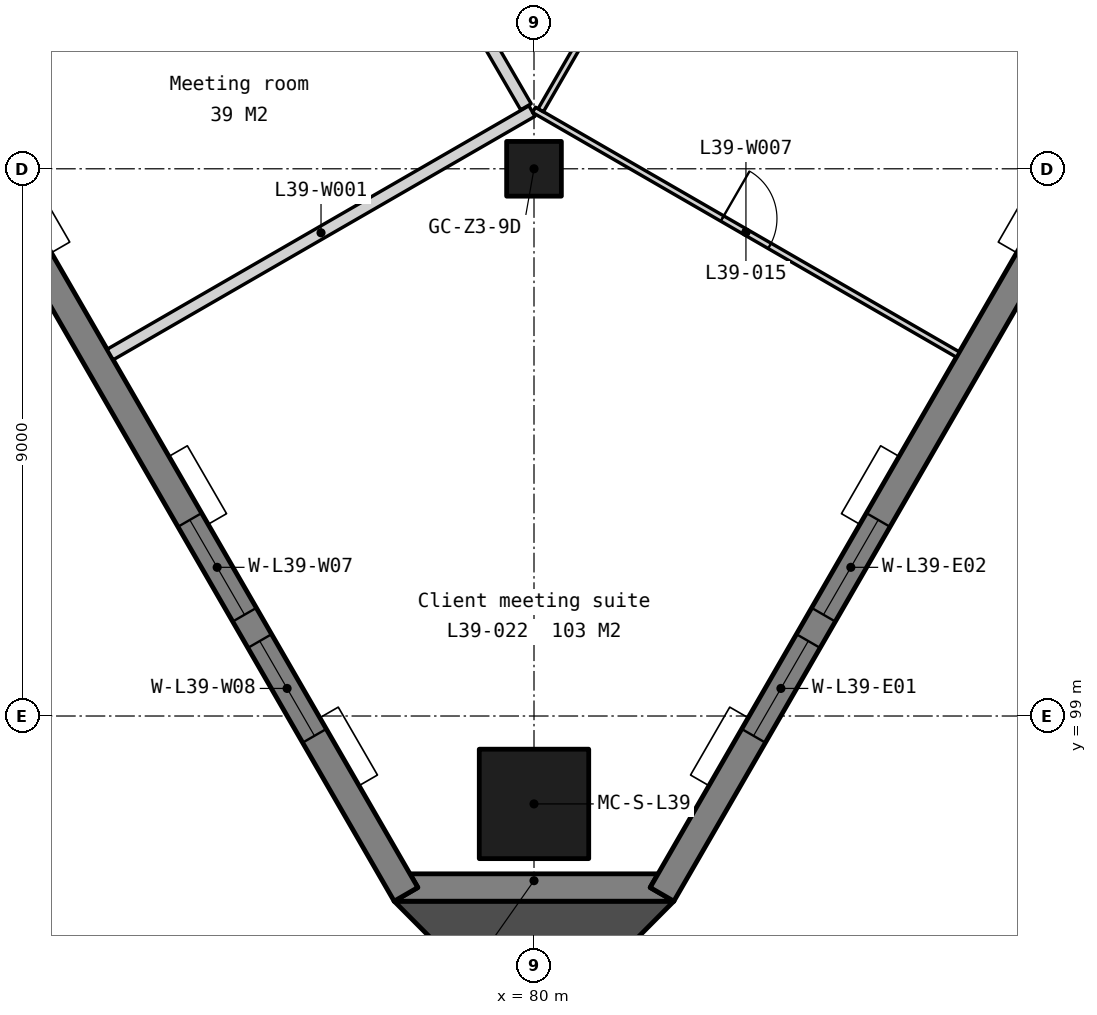
"""IFC4 building model, lengths in metres.
Left out: names, types, materials, properties, quantities, classifications, styles, units other than length and angle.
Written with IfcOpenShell. Run it as: python <this file> out.ifc"""

import sys

from ifc_helpers import new_model, si_unit, direction, frame, frame_2d, origin, origin_2d, place, context, subcontext, project, spatial, polyline, rectangle, outline, extrude, element, fill, save


model = new_model("IFC4")
c1 = context("Model", 3, precision=1e-05, world=origin(), true_north=direction((0.0, 1.0)))
c2 = subcontext(c1, "Body", "Model", "MODEL_VIEW")
j1 = project(units=[si_unit("LENGTHUNIT", "METRE"), si_unit("PLANEANGLEUNIT", "RADIAN")], contexts=[c1])
p1 = place(None, origin())
s1 = spatial("IfcSite", under=j1, at=p1, CompositionType="ELEMENT")
p2 = place(p1, origin())
s2 = spatial("IfcBuilding", under=s1, at=p2, CompositionType="ELEMENT")
p3 = place(p2, frame((0.0, 0.0, 155.9)))
s3 = spatial("IfcBuildingStorey", under=s2, at=p3, CompositionType="ELEMENT", Elevation=155.9)
p4 = place(p3, frame((80.0, 108.0, 0.0), z_axis=(0.0, 0.0, 1.0), x_axis=(1.0, 0.0, 0.0)))
e1 = element("IfcColumn", 1, at=p4, inside=s3, PredefinedType="COLUMN", context=c2, shape_type="SweptSolid", body=[
    extrude(rectangle(XDim=0.9, YDim=0.9, at=origin_2d()), origin(), (0.0, 0.0, 1.0), 3.9),
])
p5 = place(p3, frame((80.0, 97.554, 0.0), z_axis=(0.0, 0.0, 1.0), x_axis=(1.0, 0.0, 0.0)))
e2 = element("IfcColumn", 2, at=p5, inside=s3, PredefinedType="COLUMN", context=c2, shape_type="SweptSolid", body=[
    extrude(rectangle(XDim=1.8, YDim=1.8, at=origin_2d()), origin(), (0.0, 0.0, 1.0), 3.9),
])
p6 = place(p3, frame((0.0, 0.0, -0.15)))
e3 = element("IfcWall", 3, at=p6, inside=s3, PredefinedType="SOLIDWALL", context=c2, shape_type="SweptSolid", body=[
    extrude(outline(polyline([(77.7, 95.954), (78.09, 96.179), (77.96, 96.404), (82.04, 96.404), (81.91, 96.179), (82.3, 95.954), (77.7, 95.954)])), origin(), (0.0, 0.0, 1.0), 3.9),
])
p7 = place(p3, frame((57.652, 131.129, -0.15), z_axis=(0.0, 0.0, 1.0), x_axis=(0.499997369791, -0.866026922331, 0.0)))
e4 = element("IfcWall", 4, at=p7, inside=s3, PredefinedType="SOLIDWALL", context=c2, shape_type="SweptSolid", body=[
    extrude(outline(polyline([(40.486, 0.0), (40.486, 3.9), (0.0, 3.9), (0.0, 0.0), (40.486, 0.0)])), frame((0.0, 0.225, 0.0), z_axis=(0.0, -1.0, 0.0), x_axis=(1.0, 0.0, 0.0)), (0.0, 0.0, 1.0), 0.45),
])
p8 = place(p7, frame((3.011, 0.0, 0.95)))
e5 = element("IfcOpeningElement", 5, at=p8, cuts=e4, PredefinedType="OPENING", context=c2, shape_type="SweptSolid", body=[
    extrude(rectangle(XDim=1.8, YDim=2.2, at=frame_2d((0.9, 1.1))), frame((0.0, 0.235, 0.0), z_axis=(0.0, -1.0, 0.0), x_axis=(1.0, 0.0, 0.0)), (0.0, 0.0, 1.0), 0.47),
])
p9 = place(p7, frame((5.311, 0.0, 0.95)))
e6 = element("IfcOpeningElement", 6, at=p9, cuts=e4, PredefinedType="OPENING", context=c2, shape_type="SweptSolid", body=[
    extrude(rectangle(XDim=1.8, YDim=2.2, at=frame_2d((0.9, 1.1))), frame((0.0, 0.235, 0.0), z_axis=(0.0, -1.0, 0.0), x_axis=(1.0, 0.0, 0.0)), (0.0, 0.0, 1.0), 0.47),
])
p10 = place(p7, frame((13.132, 0.0, 0.95)))
e7 = element("IfcOpeningElement", 7, at=p10, cuts=e4, PredefinedType="OPENING", context=c2, shape_type="SweptSolid", body=[
    extrude(rectangle(XDim=1.8, YDim=2.2, at=frame_2d((0.9, 1.1))), frame((0.0, 0.235, 0.0), z_axis=(0.0, -1.0, 0.0), x_axis=(1.0, 0.0, 0.0)), (0.0, 0.0, 1.0), 0.47),
])
p11 = place(p7, frame((15.432, 0.0, 0.95)))
e8 = element("IfcOpeningElement", 8, at=p11, cuts=e4, PredefinedType="OPENING", context=c2, shape_type="SweptSolid", body=[
    extrude(rectangle(XDim=1.8, YDim=2.2, at=frame_2d((0.9, 1.1))), frame((0.0, 0.235, 0.0), z_axis=(0.0, -1.0, 0.0), x_axis=(1.0, 0.0, 0.0)), (0.0, 0.0, 1.0), 0.47),
])
p12 = place(p7, frame((23.254, 0.0, 0.95)))
e9 = element("IfcOpeningElement", 9, at=p12, cuts=e4, PredefinedType="OPENING", context=c2, shape_type="SweptSolid", body=[
    extrude(rectangle(XDim=1.8, YDim=2.2, at=frame_2d((0.9, 1.1))), frame((0.0, 0.235, 0.0), z_axis=(0.0, -1.0, 0.0), x_axis=(1.0, 0.0, 0.0)), (0.0, 0.0, 1.0), 0.47),
])
p13 = place(p7, frame((25.554, 0.0, 0.95)))
e10 = element("IfcOpeningElement", 10, at=p13, cuts=e4, PredefinedType="OPENING", context=c2, shape_type="SweptSolid", body=[
    extrude(rectangle(XDim=1.8, YDim=2.2, at=frame_2d((0.9, 1.1))), frame((0.0, 0.235, 0.0), z_axis=(0.0, -1.0, 0.0), x_axis=(1.0, 0.0, 0.0)), (0.0, 0.0, 1.0), 0.47),
])
p14 = place(p7, frame((33.375, 0.0, 0.95)))
e11 = element("IfcOpeningElement", 11, at=p14, cuts=e4, PredefinedType="OPENING", context=c2, shape_type="SweptSolid", body=[
    extrude(rectangle(XDim=1.8, YDim=2.2, at=frame_2d((0.9, 1.1))), frame((0.0, 0.235, 0.0), z_axis=(0.0, -1.0, 0.0), x_axis=(1.0, 0.0, 0.0)), (0.0, 0.0, 1.0), 0.47),
])
p15 = place(p7, frame((35.675, 0.0, 0.95)))
e12 = element("IfcOpeningElement", 12, at=p15, cuts=e4, PredefinedType="OPENING", context=c2, shape_type="SweptSolid", body=[
    extrude(rectangle(XDim=1.8, YDim=2.2, at=frame_2d((0.9, 1.1))), frame((0.0, 0.235, 0.0), z_axis=(0.0, -1.0, 0.0), x_axis=(1.0, 0.0, 0.0)), (0.0, 0.0, 1.0), 0.47),
])
p16 = place(p3, frame((82.105, 96.067, -0.15), z_axis=(0.0, 0.0, 1.0), x_axis=(0.499997369791, 0.866026922331, 0.0)))
e13 = element("IfcWall", 13, at=p16, inside=s3, PredefinedType="SOLIDWALL", context=c2, shape_type="SweptSolid", body=[
    extrude(outline(polyline([(40.486, 0.0), (40.486, 3.9), (0.0, 3.9), (0.0, 0.0), (40.486, 0.0)])), frame((0.0, 0.225, 0.0), z_axis=(0.0, -1.0, 0.0), x_axis=(1.0, 0.0, 0.0)), (0.0, 0.0, 1.0), 0.45),
])
p17 = place(p16, frame((3.011, 0.0, 0.95)))
e14 = element("IfcOpeningElement", 14, at=p17, cuts=e13, PredefinedType="OPENING", context=c2, shape_type="SweptSolid", body=[
    extrude(rectangle(XDim=1.8, YDim=2.2, at=frame_2d((0.9, 1.1))), frame((0.0, 0.235, 0.0), z_axis=(0.0, -1.0, 0.0), x_axis=(1.0, 0.0, 0.0)), (0.0, 0.0, 1.0), 0.47),
])
p18 = place(p16, frame((5.311, 0.0, 0.95)))
e15 = element("IfcOpeningElement", 15, at=p18, cuts=e13, PredefinedType="OPENING", context=c2, shape_type="SweptSolid", body=[
    extrude(rectangle(XDim=1.8, YDim=2.2, at=frame_2d((0.9, 1.1))), frame((0.0, 0.235, 0.0), z_axis=(0.0, -1.0, 0.0), x_axis=(1.0, 0.0, 0.0)), (0.0, 0.0, 1.0), 0.47),
])
p19 = place(p16, frame((13.132, 0.0, 0.95)))
e16 = element("IfcOpeningElement", 16, at=p19, cuts=e13, PredefinedType="OPENING", context=c2, shape_type="SweptSolid", body=[
    extrude(rectangle(XDim=1.8, YDim=2.2, at=frame_2d((0.9, 1.1))), frame((0.0, 0.235, 0.0), z_axis=(0.0, -1.0, 0.0), x_axis=(1.0, 0.0, 0.0)), (0.0, 0.0, 1.0), 0.47),
])
p20 = place(p16, frame((15.432, 0.0, 0.95)))
e17 = element("IfcOpeningElement", 17, at=p20, cuts=e13, PredefinedType="OPENING", context=c2, shape_type="SweptSolid", body=[
    extrude(rectangle(XDim=1.8, YDim=2.2, at=frame_2d((0.9, 1.1))), frame((0.0, 0.235, 0.0), z_axis=(0.0, -1.0, 0.0), x_axis=(1.0, 0.0, 0.0)), (0.0, 0.0, 1.0), 0.47),
])
p21 = place(p16, frame((23.254, 0.0, 0.95)))
e18 = element("IfcOpeningElement", 18, at=p21, cuts=e13, PredefinedType="OPENING", context=c2, shape_type="SweptSolid", body=[
    extrude(rectangle(XDim=1.8, YDim=2.2, at=frame_2d((0.9, 1.1))), frame((0.0, 0.235, 0.0), z_axis=(0.0, -1.0, 0.0), x_axis=(1.0, 0.0, 0.0)), (0.0, 0.0, 1.0), 0.47),
])
p22 = place(p16, frame((25.554, 0.0, 0.95)))
e19 = element("IfcOpeningElement", 19, at=p22, cuts=e13, PredefinedType="OPENING", context=c2, shape_type="SweptSolid", body=[
    extrude(rectangle(XDim=1.8, YDim=2.2, at=frame_2d((0.9, 1.1))), frame((0.0, 0.235, 0.0), z_axis=(0.0, -1.0, 0.0), x_axis=(1.0, 0.0, 0.0)), (0.0, 0.0, 1.0), 0.47),
])
p23 = place(p16, frame((33.375, 0.0, 0.95)))
e20 = element("IfcOpeningElement", 20, at=p23, cuts=e13, PredefinedType="OPENING", context=c2, shape_type="SweptSolid", body=[
    extrude(rectangle(XDim=1.8, YDim=2.2, at=frame_2d((0.9, 1.1))), frame((0.0, 0.235, 0.0), z_axis=(0.0, -1.0, 0.0), x_axis=(1.0, 0.0, 0.0)), (0.0, 0.0, 1.0), 0.47),
])
p24 = place(p16, frame((35.675, 0.0, 0.95)))
e21 = element("IfcOpeningElement", 21, at=p24, cuts=e13, PredefinedType="OPENING", context=c2, shape_type="SweptSolid", body=[
    extrude(rectangle(XDim=1.8, YDim=2.2, at=frame_2d((0.9, 1.1))), frame((0.0, 0.235, 0.0), z_axis=(0.0, -1.0, 0.0), x_axis=(1.0, 0.0, 0.0)), (0.0, 0.0, 1.0), 0.47),
])
p25 = place(p3, frame((0.0, 0.0, -0.15)))
e22 = element("IfcWall", 22, at=p25, inside=s3, PredefinedType="SOLIDWALL", context=c2, shape_type="SweptSolid", body=[
    extrude(outline(polyline([(77.7, 95.954), (80.0, 93.641), (82.3, 95.954), (77.7, 95.954)])), origin(), (0.0, 0.0, 1.0), 3.9),
])
p26 = place(p3, frame((73.029, 104.945, 0.0), z_axis=(0.0, 0.0, 1.0), x_axis=(0.866028745538, 0.499994211868, 0.0)))
e23 = element("IfcWall", 23, at=p26, inside=s3, PredefinedType="PARTITIONING", context=c2, shape_type="SweptSolid", body=[
    extrude(rectangle(XDim=8.01, YDim=0.2, at=frame_2d((4.005, 0.0))), origin(), (0.0, 0.0, 1.0), 3.75),
])
p27 = place(p3, frame((77.384, 113.302, 0.0), z_axis=(0.0, 0.0, 1.0), x_axis=(0.501726207978, -0.865026480651, 0.0)))
e24 = element("IfcWall", 24, at=p27, inside=s3, PredefinedType="PARTITIONING", context=c2, shape_type="SweptSolid", body=[
    extrude(rectangle(XDim=4.951, YDim=0.2, at=frame_2d((2.475, 0.0))), origin(), (0.0, 0.0, 1.0), 3.75),
])
p28 = place(p3, frame((80.0, 108.969, 0.0), z_axis=(0.0, 0.0, 1.0), x_axis=(0.86602648383, -0.499998129301, 0.0)))
e25 = element("IfcWall", 25, at=p28, inside=s3, PredefinedType="PARTITIONING", context=c2, shape_type="SweptSolid", body=[
    extrude(rectangle(XDim=8.049, YDim=0.1, at=frame_2d((4.025, 0.0))), origin(), (0.0, 0.0, 1.0), 3.75),
])
p29 = place(p28, frame((3.575, 0.0, 0.0)))
e26 = element("IfcOpeningElement", 26, at=p29, cuts=e25, PredefinedType="OPENING", context=c2, shape_type="SweptSolid", body=[
    extrude(rectangle(XDim=0.9, YDim=2.1, at=frame_2d((0.45, 1.05))), frame((0.0, 0.06, 0.0), z_axis=(0.0, -1.0, 0.0), x_axis=(1.0, 0.0, 0.0)), (0.0, 0.0, 1.0), 0.12),
])
p30 = place(p3, frame((70.499, 109.327, 0.0), z_axis=(0.0, 0.0, 1.0), x_axis=(0.86602399778, 0.500002435262, 0.0)))
e27 = element("IfcWall", 27, at=p30, inside=s3, PredefinedType="PARTITIONING", context=c2, shape_type="SweptSolid", body=[
    extrude(rectangle(XDim=7.85, YDim=0.1, at=frame_2d((3.925, 0.0))), origin(), (0.0, 0.0, 1.0), 3.75),
])
p31 = place(p30, frame((3.475, 0.0, 0.0)))
e28 = element("IfcOpeningElement", 28, at=p31, cuts=e27, PredefinedType="OPENING", context=c2, shape_type="SweptSolid", body=[
    extrude(rectangle(XDim=0.9, YDim=2.1, at=frame_2d((0.45, 1.05))), frame((0.0, 0.06, 0.0), z_axis=(0.0, -1.0, 0.0), x_axis=(1.0, 0.0, 0.0)), (0.0, 0.0, 1.0), 0.12),
])
p32 = place(p3, frame((80.111, 108.963, 0.0), z_axis=(0.0, 0.0, 1.0), x_axis=(0.500033177651, 0.866006247812, 0.0)))
e29 = element("IfcWall", 29, at=p32, inside=s3, PredefinedType="PARTITIONING", context=c2, shape_type="SweptSolid", body=[
    extrude(rectangle(XDim=5.758, YDim=0.1, at=frame_2d((2.879, 0.0))), origin(), (0.0, 0.0, 1.0), 3.75),
])
p33 = place(p32, frame((2.429, 0.0, 0.0)))
e30 = element("IfcOpeningElement", 30, at=p33, cuts=e29, PredefinedType="OPENING", context=c2, shape_type="SweptSolid", body=[
    extrude(rectangle(XDim=0.9, YDim=2.1, at=frame_2d((0.45, 1.05))), frame((0.0, 0.06, 0.0), z_axis=(0.0, -1.0, 0.0), x_axis=(1.0, 0.0, 0.0)), (0.0, 0.0, 1.0), 0.12),
])
p34 = place(p14, origin())
e31 = element("IfcWindow", 31, at=p34, inside=s3, PartitioningType="SINGLE_PANEL", PredefinedType="WINDOW", context=c2, shape_type="SweptSolid", body=[
    extrude(rectangle(XDim=1.8, YDim=2.2, at=frame_2d((0.9, 1.1))), frame((0.0, 0.03, 0.0), z_axis=(0.0, -1.0, 0.0), x_axis=(1.0, 0.0, 0.0)), (0.0, 0.0, 1.0), 0.06),
])
fill(e11, e31)
p35 = place(p15, origin())
e32 = element("IfcWindow", 32, at=p35, inside=s3, PartitioningType="SINGLE_PANEL", PredefinedType="WINDOW", context=c2, shape_type="SweptSolid", body=[
    extrude(rectangle(XDim=1.8, YDim=2.2, at=frame_2d((0.9, 1.1))), frame((0.0, 0.03, 0.0), z_axis=(0.0, -1.0, 0.0), x_axis=(1.0, 0.0, 0.0)), (0.0, 0.0, 1.0), 0.06),
])
fill(e12, e32)
p36 = place(p17, origin())
e33 = element("IfcWindow", 33, at=p36, inside=s3, PartitioningType="SINGLE_PANEL", PredefinedType="WINDOW", context=c2, shape_type="SweptSolid", body=[
    extrude(rectangle(XDim=1.8, YDim=2.2, at=frame_2d((0.9, 1.1))), frame((0.0, 0.03, 0.0), z_axis=(0.0, -1.0, 0.0), x_axis=(1.0, 0.0, 0.0)), (0.0, 0.0, 1.0), 0.06),
])
fill(e14, e33)
p37 = place(p18, origin())
e34 = element("IfcWindow", 34, at=p37, inside=s3, PartitioningType="SINGLE_PANEL", PredefinedType="WINDOW", context=c2, shape_type="SweptSolid", body=[
    extrude(rectangle(XDim=1.8, YDim=2.2, at=frame_2d((0.9, 1.1))), frame((0.0, 0.03, 0.0), z_axis=(0.0, -1.0, 0.0), x_axis=(1.0, 0.0, 0.0)), (0.0, 0.0, 1.0), 0.06),
])
fill(e15, e34)
p38 = place(p29, origin())
e35 = element("IfcDoor", 35, at=p38, inside=s3, OperationType="SINGLE_SWING_LEFT", PredefinedType="DOOR", context=c2, shape_type="SweptSolid", body=[
    extrude(rectangle(XDim=0.9, YDim=2.1, at=frame_2d((0.45, 1.05))), frame((0.0, 0.025, 0.0), z_axis=(0.0, -1.0, 0.0), x_axis=(1.0, 0.0, 0.0)), (0.0, 0.0, 1.0), 0.05),
])
fill(e26, e35)
save(model, sys.argv[1])
